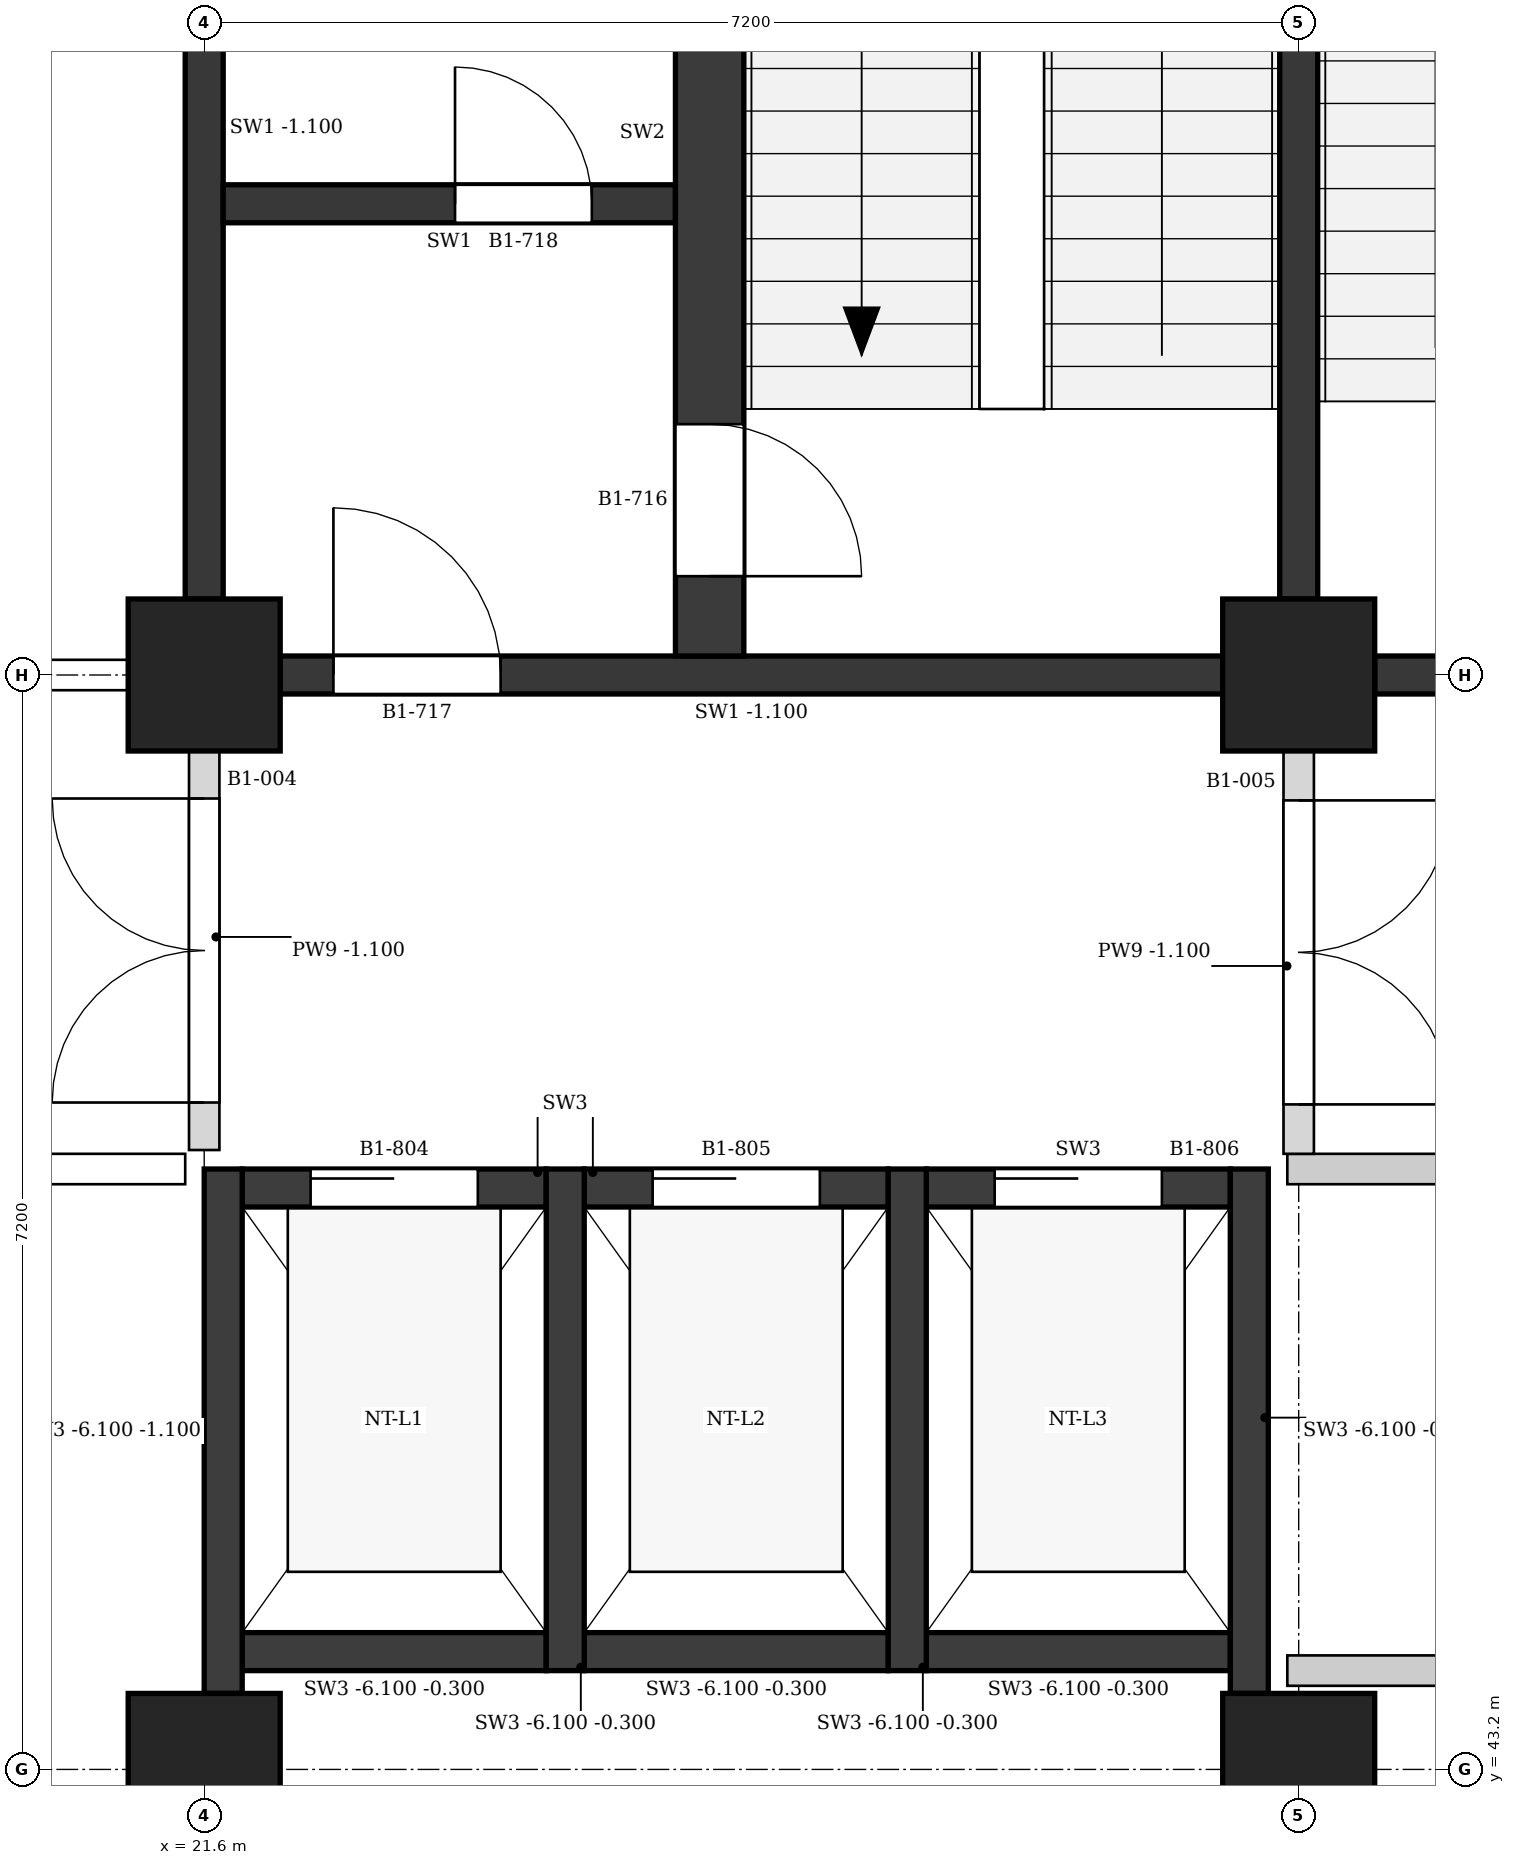
"""IFC4 building model, lengths in metres.
Left out: names, types, materials, properties, quantities, classifications, styles, units other than length and angle.
Written with IfcOpenShell. Run it as: python <this file> out.ifc"""

import sys

from ifc_helpers import new_model, si_unit, direction, frame, frame_2d, origin, origin_2d, place, context, subcontext, project, spatial, polyline, rectangle, outline, extrude, element, fill, save


model = new_model("IFC4")
c1 = context("Model", 3, precision=1e-05, world=origin(), true_north=direction((0.0, 1.0)))
c2 = subcontext(c1, "Body", "Model", "MODEL_VIEW")
j1 = project(units=[si_unit("LENGTHUNIT", "METRE"), si_unit("PLANEANGLEUNIT", "RADIAN")], contexts=[c1])
p1 = place(None, origin())
s1 = spatial("IfcSite", under=j1, at=p1, CompositionType="ELEMENT")
p2 = place(p1, origin())
s2 = spatial("IfcBuilding", under=s1, at=p2, CompositionType="ELEMENT")
p3 = place(p2, frame((0.0, 0.0, -4.5)))
s3 = spatial("IfcBuildingStorey", under=s2, at=p3, CompositionType="ELEMENT", Elevation=-4.5)
for number, where, z_axis, x_axis in (
    (1, (21.6, 43.2, 0.0), (0.0, 0.0, 1.0), (1.0, 0.0, 0.0)),
    (2, (21.6, 50.4, 0.0), (0.0, 0.0, 1.0), (1.0, 0.0, 0.0)),
    (3, (28.8, 43.2, 0.0), (0.0, 0.0, 1.0), (1.0, 0.0, 0.0)),
    (4, (28.8, 50.4, 0.0), (0.0, 0.0, 1.0), (1.0, 0.0, 0.0)),
):
    element("IfcColumn", number, at=place(p3, frame(where, z_axis=z_axis, x_axis=x_axis)), inside=s3, PredefinedType="COLUMN", context=c2, shape_type="SweptSolid", body=[
        extrude(rectangle(XDim=1.0, YDim=1.0, at=origin_2d()), origin(), (0.0, 0.0, 1.0), 4.5),
    ])
p4 = place(p3, frame((29.3, 50.4, 0.0), z_axis=(0.0, 0.0, 1.0), x_axis=(1.0, 0.0, 0.0)))
e5 = element("IfcWall", 5, at=p4, inside=s3, PredefinedType="SHEAR", context=c2, shape_type="SweptSolid", body=[
    extrude(rectangle(XDim=6.275, YDim=0.25, at=frame_2d((3.137, 0.0))), origin(), (0.0, 0.0, 1.0), 3.4),
])
p5 = place(p4, frame((4.75, 0.0, 0.0)))
e6 = element("IfcOpeningElement", 6, at=p5, cuts=e5, PredefinedType="OPENING", context=c2, shape_type="SweptSolid", body=[
    extrude(rectangle(XDim=1.1, YDim=2.1, at=frame_2d((0.55, 1.05))), frame((0.0, 0.135, 0.0), z_axis=(0.0, -1.0, 0.0), x_axis=(1.0, 0.0, 0.0)), (0.0, 0.0, 1.0), 0.27),
])
p6 = place(p3, frame((28.8, 50.9, 0.0), z_axis=(0.0, 0.0, 1.0), x_axis=(0.0, 1.0, 0.0)))
e7 = element("IfcWall", 7, at=p6, inside=s3, PredefinedType="SHEAR", context=c2, shape_type="SweptSolid", body=[
    extrude(rectangle(XDim=6.2, YDim=0.25, at=frame_2d((3.1, 0.0))), origin(), (0.0, 0.0, 1.0), 3.4),
])
p7 = place(p3, frame((22.1, 50.4, 0.0), z_axis=(0.0, 0.0, 1.0), x_axis=(1.0, 0.0, 0.0)))
e8 = element("IfcWall", 8, at=p7, inside=s3, PredefinedType="SHEAR", context=c2, shape_type="SweptSolid", body=[
    extrude(rectangle(XDim=6.2, YDim=0.25, at=frame_2d((3.1, 0.0))), origin(), (0.0, 0.0, 1.0), 3.4),
])
p8 = place(p7, frame((0.35, 0.0, 0.0)))
e9 = element("IfcOpeningElement", 9, at=p8, cuts=e8, PredefinedType="OPENING", context=c2, shape_type="SweptSolid", body=[
    extrude(rectangle(XDim=1.1, YDim=2.1, at=frame_2d((0.55, 1.05))), frame((0.0, 0.135, 0.0), z_axis=(0.0, -1.0, 0.0), x_axis=(1.0, 0.0, 0.0)), (0.0, 0.0, 1.0), 0.27),
])
p9 = place(p3, frame((21.6, 50.9, 0.0), z_axis=(0.0, 0.0, 1.0), x_axis=(0.0, 1.0, 0.0)))
e10 = element("IfcWall", 10, at=p9, inside=s3, PredefinedType="SHEAR", context=c2, shape_type="SweptSolid", body=[
    extrude(rectangle(XDim=6.2, YDim=0.25, at=frame_2d((3.1, 0.0))), origin(), (0.0, 0.0, 1.0), 3.4),
])
p10 = place(p3, frame((24.925, 50.525, 0.0), z_axis=(0.0, 0.0, 1.0), x_axis=(0.0, 1.0, 0.0)))
e11 = element("IfcWall", 11, at=p10, inside=s3, PredefinedType="SHEAR", context=c2, shape_type="SweptSolid", body=[
    extrude(rectangle(XDim=6.875, YDim=0.45, at=frame_2d((3.438, 0.0))), origin(), (0.0, 0.0, 1.0), 4.2),
])
p11 = place(p10, frame((0.525, 0.0, 0.0)))
e12 = element("IfcOpeningElement", 12, at=p11, cuts=e11, PredefinedType="OPENING", context=c2, shape_type="SweptSolid", body=[
    extrude(rectangle(XDim=1.0, YDim=2.1, at=frame_2d((0.5, 1.05))), frame((0.0, 0.235, 0.0), z_axis=(0.0, -1.0, 0.0), x_axis=(1.0, 0.0, 0.0)), (0.0, 0.0, 1.0), 0.47),
])
p12 = place(p3, frame((21.725, 53.5, 0.0), z_axis=(0.0, 0.0, 1.0), x_axis=(1.0, 0.0, 0.0)))
e13 = element("IfcWall", 13, at=p12, inside=s3, PredefinedType="SHEAR", context=c2, shape_type="SweptSolid", body=[
    extrude(rectangle(XDim=2.975, YDim=0.25, at=frame_2d((1.487, 0.0))), origin(), (0.0, 0.0, 1.0), 4.2),
])
p13 = place(p12, frame((1.525, 0.0, 0.0)))
e14 = element("IfcOpeningElement", 14, at=p13, cuts=e13, PredefinedType="OPENING", context=c2, shape_type="SweptSolid", body=[
    extrude(rectangle(XDim=0.9, YDim=2.1, at=frame_2d((0.45, 1.05))), frame((0.0, 0.135, 0.0), z_axis=(0.0, -1.0, 0.0), x_axis=(1.0, 0.0, 0.0)), (0.0, 0.0, 1.0), 0.27),
])
p14 = place(p3, frame((21.725, 43.7, -1.6), z_axis=(0.0, 0.0, 1.0), x_axis=(0.0, 1.0, 0.0)))
e15 = element("IfcWall", 15, at=p14, inside=s3, PredefinedType="SHEAR", context=c2, shape_type="SweptSolid", body=[
    extrude(rectangle(XDim=3.45, YDim=0.25, at=frame_2d((1.725, 0.0))), origin(), (0.0, 0.0, 1.0), 5.0),
])
for number, where, z_axis, x_axis in (
    (16, (23.975, 43.85, -1.6), (0.0, 0.0, 1.0), (0.0, 1.0, 0.0)),
    (17, (26.225, 43.85, -1.6), (0.0, 0.0, 1.0), (0.0, 1.0, 0.0)),
):
    element("IfcWall", number, at=place(p3, frame(where, z_axis=z_axis, x_axis=x_axis)), inside=s3, PredefinedType="SHEAR", context=c2, shape_type="SweptSolid", body=[
        extrude(rectangle(XDim=3.3, YDim=0.25, at=frame_2d((1.65, 0.0))), origin(), (0.0, 0.0, 1.0), 5.8),
    ])
p15 = place(p3, frame((28.475, 43.7, -1.6), z_axis=(0.0, 0.0, 1.0), x_axis=(0.0, 1.0, 0.0)))
e18 = element("IfcWall", 18, at=p15, inside=s3, PredefinedType="SHEAR", context=c2, shape_type="SweptSolid", body=[
    extrude(rectangle(XDim=3.45, YDim=0.25, at=frame_2d((1.725, 0.0))), origin(), (0.0, 0.0, 1.0), 5.8),
])
p16 = place(p3, frame((21.85, 47.025, 0.0), z_axis=(0.0, 0.0, 1.0), x_axis=(1.0, 0.0, 0.0)))
e19 = element("IfcWall", 19, at=p16, inside=s3, PredefinedType="SHEAR", context=c2, shape_type="SweptSolid", body=[
    extrude(rectangle(XDim=2.0, YDim=0.25, at=frame_2d((1.0, 0.0))), origin(), (0.0, 0.0, 1.0), 4.2),
])
p17 = place(p16, frame((0.45, 0.0, 0.0)))
e20 = element("IfcOpeningElement", 20, at=p17, cuts=e19, PredefinedType="OPENING", context=c2, shape_type="SweptSolid", body=[
    extrude(rectangle(XDim=1.1, YDim=2.1, at=frame_2d((0.55, 1.05))), frame((0.0, 0.135, 0.0), z_axis=(0.0, -1.0, 0.0), x_axis=(1.0, 0.0, 0.0)), (0.0, 0.0, 1.0), 0.27),
])
p18 = place(p3, frame((21.85, 43.975, -1.6), z_axis=(0.0, 0.0, 1.0), x_axis=(1.0, 0.0, 0.0)))
e21 = element("IfcWall", 21, at=p18, inside=s3, PredefinedType="SHEAR", context=c2, shape_type="SweptSolid", body=[
    extrude(rectangle(XDim=2.0, YDim=0.25, at=frame_2d((1.0, 0.0))), origin(), (0.0, 0.0, 1.0), 5.8),
])
p19 = place(p3, frame((24.1, 47.025, 0.0), z_axis=(0.0, 0.0, 1.0), x_axis=(1.0, 0.0, 0.0)))
e22 = element("IfcWall", 22, at=p19, inside=s3, PredefinedType="SHEAR", context=c2, shape_type="SweptSolid", body=[
    extrude(rectangle(XDim=2.0, YDim=0.25, at=frame_2d((1.0, 0.0))), origin(), (0.0, 0.0, 1.0), 4.2),
])
p20 = place(p19, frame((0.45, 0.0, 0.0)))
e23 = element("IfcOpeningElement", 23, at=p20, cuts=e22, PredefinedType="OPENING", context=c2, shape_type="SweptSolid", body=[
    extrude(rectangle(XDim=1.1, YDim=2.1, at=frame_2d((0.55, 1.05))), frame((0.0, 0.135, 0.0), z_axis=(0.0, -1.0, 0.0), x_axis=(1.0, 0.0, 0.0)), (0.0, 0.0, 1.0), 0.27),
])
p21 = place(p3, frame((24.1, 43.975, -1.6), z_axis=(0.0, 0.0, 1.0), x_axis=(1.0, 0.0, 0.0)))
e24 = element("IfcWall", 24, at=p21, inside=s3, PredefinedType="SHEAR", context=c2, shape_type="SweptSolid", body=[
    extrude(rectangle(XDim=2.0, YDim=0.25, at=frame_2d((1.0, 0.0))), origin(), (0.0, 0.0, 1.0), 5.8),
])
p22 = place(p3, frame((26.35, 47.025, 0.0), z_axis=(0.0, 0.0, 1.0), x_axis=(1.0, 0.0, 0.0)))
e25 = element("IfcWall", 25, at=p22, inside=s3, PredefinedType="SHEAR", context=c2, shape_type="SweptSolid", body=[
    extrude(rectangle(XDim=2.0, YDim=0.25, at=frame_2d((1.0, 0.0))), origin(), (0.0, 0.0, 1.0), 4.2),
])
p23 = place(p22, frame((0.45, 0.0, 0.0)))
e26 = element("IfcOpeningElement", 26, at=p23, cuts=e25, PredefinedType="OPENING", context=c2, shape_type="SweptSolid", body=[
    extrude(rectangle(XDim=1.1, YDim=2.1, at=frame_2d((0.55, 1.05))), frame((0.0, 0.135, 0.0), z_axis=(0.0, -1.0, 0.0), x_axis=(1.0, 0.0, 0.0)), (0.0, 0.0, 1.0), 0.27),
])
p24 = place(p3, frame((26.35, 43.975, -1.6), z_axis=(0.0, 0.0, 1.0), x_axis=(1.0, 0.0, 0.0)))
e27 = element("IfcWall", 27, at=p24, inside=s3, PredefinedType="SHEAR", context=c2, shape_type="SweptSolid", body=[
    extrude(rectangle(XDim=2.0, YDim=0.25, at=frame_2d((1.0, 0.0))), origin(), (0.0, 0.0, 1.0), 5.8),
])
p25 = place(p3, frame((28.725, 43.85, 0.0), z_axis=(0.0, 0.0, 1.0), x_axis=(1.0, 0.0, 0.0)))
e28 = element("IfcWall", 28, at=p25, inside=s3, PredefinedType="SOLIDWALL", context=c2, shape_type="SweptSolid", body=[
    extrude(outline(polyline([(0.0, 0.0), (7.175, 0.0), (7.175, 3.4), (6.975, 3.4), (6.975, 4.2), (0.375, 4.2), (0.375, 3.4), (0.0, 3.4), (0.0, 0.0)])), frame((0.0, 0.1, 0.0), z_axis=(0.0, -1.0, 0.0), x_axis=(1.0, 0.0, 0.0)), (0.0, 0.0, 1.0), 0.2),
])
p26 = place(p3, frame((3.5, 47.15, 0.0), z_axis=(0.0, 0.0, 1.0), x_axis=(1.0, 0.0, 0.0)))
e29 = element("IfcWall", 29, at=p26, inside=s3, PredefinedType="PARTITIONING", context=c2, shape_type="SweptSolid", body=[
    extrude(outline(polyline([(0.0, 0.0), (17.975, 0.0), (17.975, 3.4), (17.8, 3.4), (17.8, 4.2), (11.2, 4.2), (11.2, 3.4), (10.6, 3.4), (10.6, 4.2), (4.0, 4.2), (4.0, 3.4), (3.4, 3.4), (3.4, 4.2), (0.0, 4.2), (0.0, 0.0)])), frame((0.0, 0.1, 0.0), z_axis=(0.0, -1.0, 0.0), x_axis=(1.0, 0.0, 0.0)), (0.0, 0.0, 1.0), 0.2),
])
p27 = place(p26, frame((13.938, 0.0, 0.0)))
e30 = element("IfcOpeningElement", 30, at=p27, cuts=e29, PredefinedType="OPENING", context=c2, shape_type="SweptSolid", body=[
    extrude(rectangle(XDim=1.0, YDim=2.1, at=frame_2d((0.5, 1.05))), frame((0.0, 0.11, 0.0), z_axis=(0.0, -1.0, 0.0), x_axis=(1.0, 0.0, 0.0)), (0.0, 0.0, 1.0), 0.22),
])
p28 = place(p3, frame((28.725, 47.15, 0.0), z_axis=(0.0, 0.0, 1.0), x_axis=(1.0, 0.0, 0.0)))
e31 = element("IfcWall", 31, at=p28, inside=s3, PredefinedType="SOLIDWALL", context=c2, shape_type="SweptSolid", body=[
    extrude(outline(polyline([(0.0, 0.0), (7.375, 0.0), (7.375, 3.4), (6.975, 3.4), (6.975, 4.2), (0.375, 4.2), (0.375, 3.4), (0.0, 3.4), (0.0, 0.0)])), frame((0.0, 0.1, 0.0), z_axis=(0.0, -1.0, 0.0), x_axis=(1.0, 0.0, 0.0)), (0.0, 0.0, 1.0), 0.2),
])
p29 = place(p28, frame((3.225, 0.0, 0.0)))
e32 = element("IfcOpeningElement", 32, at=p29, cuts=e31, PredefinedType="OPENING", context=c2, shape_type="SweptSolid", body=[
    extrude(rectangle(XDim=0.9, YDim=2.1, at=frame_2d((0.45, 1.05))), frame((0.0, 0.11, 0.0), z_axis=(0.0, -1.0, 0.0), x_axis=(1.0, 0.0, 0.0)), (0.0, 0.0, 1.0), 0.22),
])
p30 = place(p3, frame((14.9, 50.4, 0.0), z_axis=(0.0, 0.0, 1.0), x_axis=(1.0, 0.0, 0.0)))
e33 = element("IfcWall", 33, at=p30, inside=s3, PredefinedType="PARTITIONING", context=c2, shape_type="SweptSolid", body=[
    extrude(rectangle(XDim=6.2, YDim=0.2, at=frame_2d((3.1, 0.0))), origin(), (0.0, 0.0, 1.0), 3.4),
])
p31 = place(p30, frame((2.6, 0.0, 0.0)))
e34 = element("IfcOpeningElement", 34, at=p31, cuts=e33, PredefinedType="OPENING", context=c2, shape_type="SweptSolid", body=[
    extrude(rectangle(XDim=1.0, YDim=2.1, at=frame_2d((0.5, 1.05))), frame((0.0, 0.11, 0.0), z_axis=(0.0, -1.0, 0.0), x_axis=(1.0, 0.0, 0.0)), (0.0, 0.0, 1.0), 0.22),
])
p32 = place(p3, frame((21.6, 47.275, 0.0), z_axis=(0.0, 0.0, 1.0), x_axis=(0.0, 1.0, 0.0)))
e35 = element("IfcWall", 35, at=p32, inside=s3, PredefinedType="PARTITIONING", context=c2, shape_type="SweptSolid", body=[
    extrude(rectangle(XDim=2.625, YDim=0.2, at=frame_2d((1.312, 0.0))), origin(), (0.0, 0.0, 1.0), 3.4),
])
p33 = place(p32, frame((0.312, 0.0, 0.0)))
e36 = element("IfcOpeningElement", 36, at=p33, cuts=e35, PredefinedType="OPENING", context=c2, shape_type="SweptSolid", body=[
    extrude(rectangle(XDim=2.0, YDim=2.4, at=frame_2d((1.0, 1.2))), frame((0.0, 0.11, 0.0), z_axis=(0.0, -1.0, 0.0), x_axis=(1.0, 0.0, 0.0)), (0.0, 0.0, 1.0), 0.22),
])
p34 = place(p3, frame((28.8, 47.25, 0.0), z_axis=(0.0, 0.0, 1.0), x_axis=(0.0, 1.0, 0.0)))
e37 = element("IfcWall", 37, at=p34, inside=s3, PredefinedType="PARTITIONING", context=c2, shape_type="SweptSolid", body=[
    extrude(rectangle(XDim=2.65, YDim=0.2, at=frame_2d((1.325, 0.0))), origin(), (0.0, 0.0, 1.0), 3.4),
])
p35 = place(p34, frame((0.325, 0.0, 0.0)))
e38 = element("IfcOpeningElement", 38, at=p35, cuts=e37, PredefinedType="OPENING", context=c2, shape_type="SweptSolid", body=[
    extrude(rectangle(XDim=2.0, YDim=2.4, at=frame_2d((1.0, 1.2))), frame((0.0, 0.11, 0.0), z_axis=(0.0, -1.0, 0.0), x_axis=(1.0, 0.0, 0.0)), (0.0, 0.0, 1.0), 0.22),
])
p36 = place(p11, frame((1.0, 0.0, 0.0), z_axis=(0.0, 0.0, 1.0), x_axis=(-1.0, 0.0, 0.0)))
e39 = element("IfcDoor", 39, at=p36, inside=s3, OperationType="SINGLE_SWING_RIGHT", PredefinedType="DOOR", context=c2, shape_type="SweptSolid", body=[
    extrude(rectangle(XDim=1.0, YDim=2.1, at=frame_2d((0.5, 1.05))), frame((0.0, 0.025, 0.0), z_axis=(0.0, -1.0, 0.0), x_axis=(1.0, 0.0, 0.0)), (0.0, 0.0, 1.0), 0.05),
])
fill(e12, e39)
p37 = place(p8, origin())
e40 = element("IfcDoor", 40, at=p37, inside=s3, OperationType="SINGLE_SWING_LEFT", PredefinedType="DOOR", context=c2, shape_type="SweptSolid", body=[
    extrude(rectangle(XDim=1.1, YDim=2.1, at=frame_2d((0.55, 1.05))), frame((0.0, 0.025, 0.0), z_axis=(0.0, -1.0, 0.0), x_axis=(1.0, 0.0, 0.0)), (0.0, 0.0, 1.0), 0.05),
])
fill(e9, e40)
p38 = place(p13, origin())
e41 = element("IfcDoor", 41, at=p38, inside=s3, OperationType="SINGLE_SWING_LEFT", PredefinedType="DOOR", context=c2, shape_type="SweptSolid", body=[
    extrude(rectangle(XDim=0.9, YDim=2.1, at=frame_2d((0.45, 1.05))), frame((0.0, 0.025, 0.0), z_axis=(0.0, -1.0, 0.0), x_axis=(1.0, 0.0, 0.0)), (0.0, 0.0, 1.0), 0.05),
])
fill(e14, e41)
p39 = place(p17, origin())
e42 = element("IfcDoor", 42, at=p39, inside=s3, OperationType="SLIDING_TO_LEFT", PredefinedType="DOOR", context=c2, shape_type="SweptSolid", body=[
    extrude(rectangle(XDim=1.1, YDim=2.1, at=frame_2d((0.55, 1.05))), frame((0.0, 0.025, 0.0), z_axis=(0.0, -1.0, 0.0), x_axis=(1.0, 0.0, 0.0)), (0.0, 0.0, 1.0), 0.05),
])
fill(e20, e42)
p40 = place(p20, origin())
e43 = element("IfcDoor", 43, at=p40, inside=s3, OperationType="SLIDING_TO_LEFT", PredefinedType="DOOR", context=c2, shape_type="SweptSolid", body=[
    extrude(rectangle(XDim=1.1, YDim=2.1, at=frame_2d((0.55, 1.05))), frame((0.0, 0.025, 0.0), z_axis=(0.0, -1.0, 0.0), x_axis=(1.0, 0.0, 0.0)), (0.0, 0.0, 1.0), 0.05),
])
fill(e23, e43)
p41 = place(p23, origin())
e44 = element("IfcDoor", 44, at=p41, inside=s3, OperationType="SLIDING_TO_LEFT", PredefinedType="DOOR", context=c2, shape_type="SweptSolid", body=[
    extrude(rectangle(XDim=1.1, YDim=2.1, at=frame_2d((0.55, 1.05))), frame((0.0, 0.025, 0.0), z_axis=(0.0, -1.0, 0.0), x_axis=(1.0, 0.0, 0.0)), (0.0, 0.0, 1.0), 0.05),
])
fill(e26, e44)
p42 = place(p33, origin())
e45 = element("IfcDoor", 45, at=p42, inside=s3, OperationType="DOUBLE_DOOR_SINGLE_SWING", PredefinedType="DOOR", context=c2, shape_type="SweptSolid", body=[
    extrude(rectangle(XDim=2.0, YDim=2.4, at=frame_2d((1.0, 1.2))), frame((0.0, 0.025, 0.0), z_axis=(0.0, -1.0, 0.0), x_axis=(1.0, 0.0, 0.0)), (0.0, 0.0, 1.0), 0.05),
])
fill(e36, e45)
p43 = place(p35, origin())
e46 = element("IfcDoor", 46, at=p43, inside=s3, OperationType="DOUBLE_DOOR_SINGLE_SWING", PredefinedType="DOOR", context=c2, shape_type="SweptSolid", body=[
    extrude(rectangle(XDim=2.0, YDim=2.4, at=frame_2d((1.0, 1.2))), frame((0.0, 0.025, 0.0), z_axis=(0.0, -1.0, 0.0), x_axis=(1.0, 0.0, 0.0)), (0.0, 0.0, 1.0), 0.05),
])
fill(e38, e46)
save(model, sys.argv[1])
